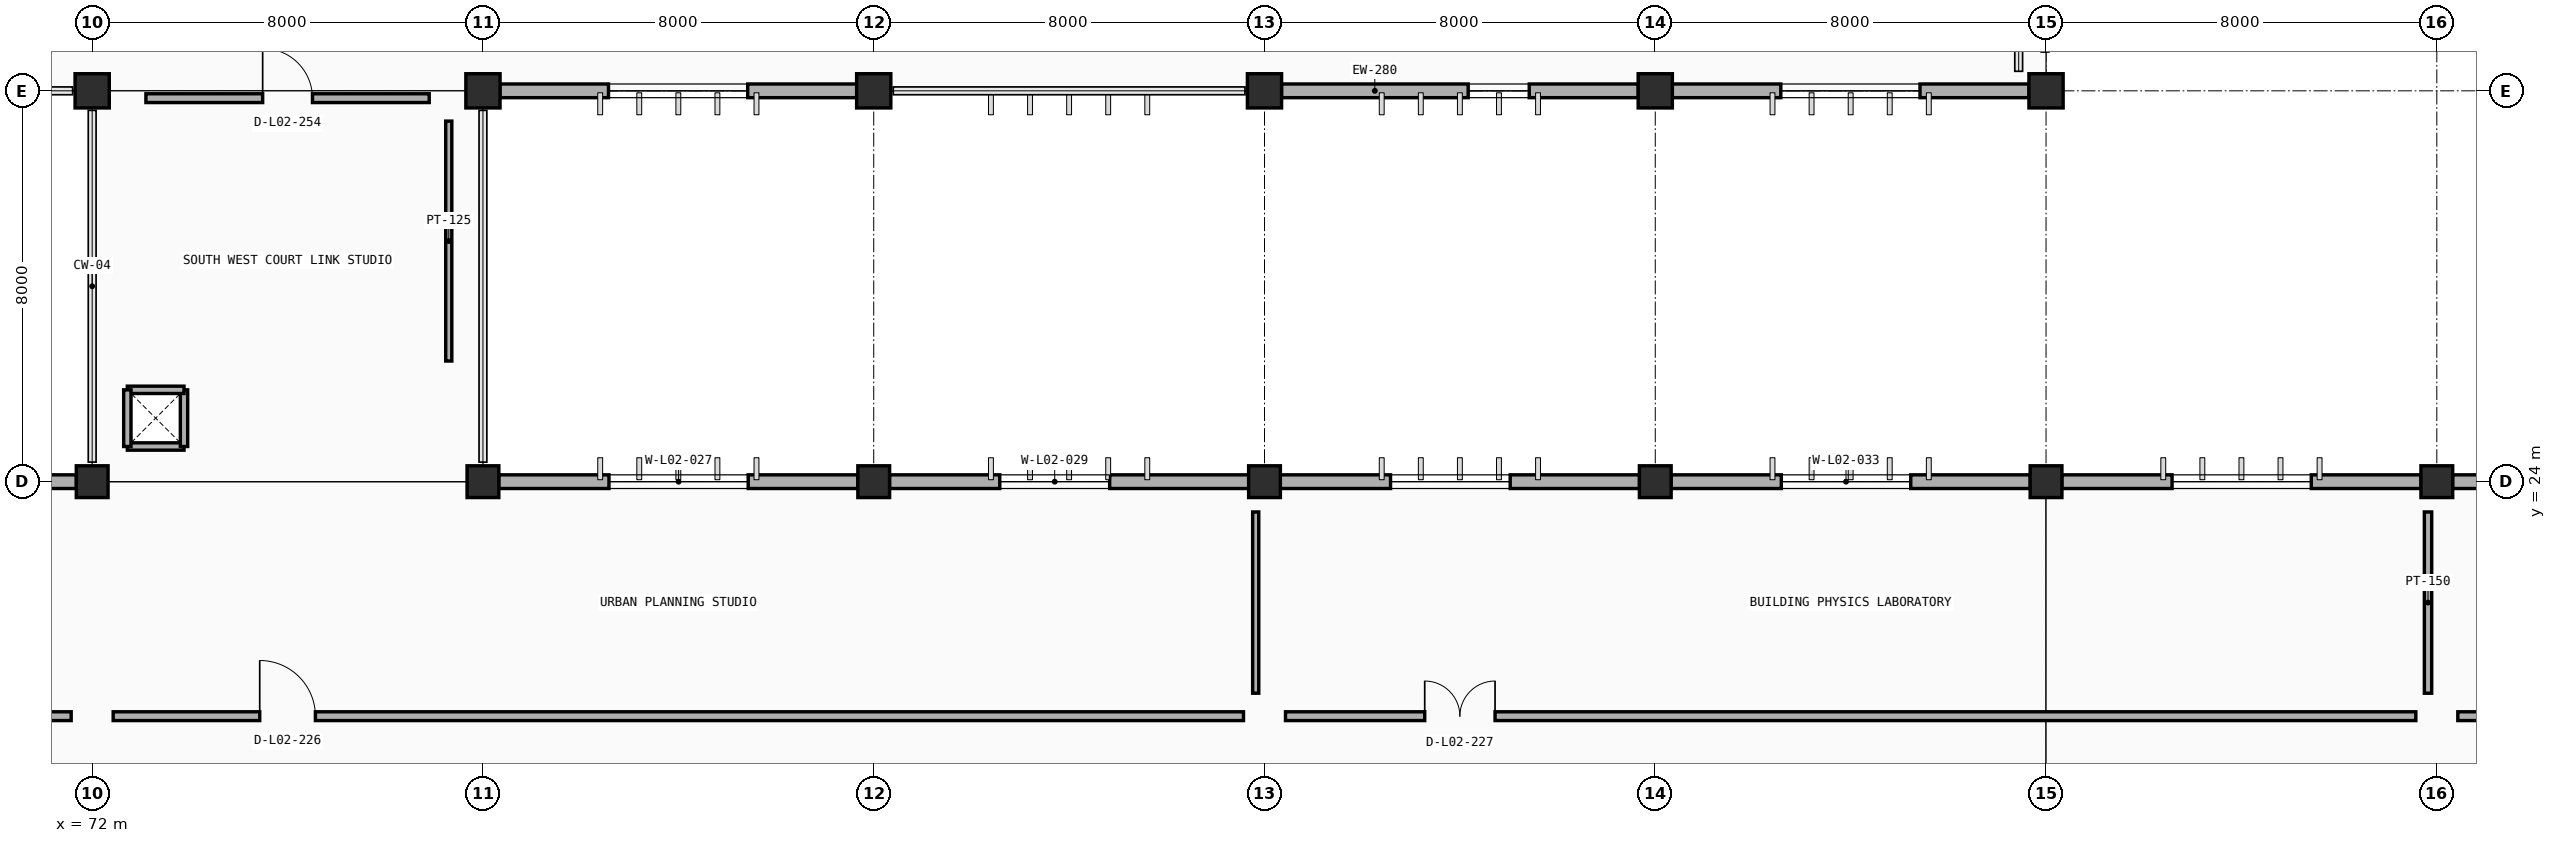
"""IFC4 building model, lengths in metres.
Left out: names, types, materials, properties, quantities, classifications, styles, units other than length and angle.
Written with IfcOpenShell. Run it as: python <this file> out.ifc"""

import sys

from ifc_helpers import new_model, si_unit, direction, frame, frame_2d, origin, origin_2d, place, context, subcontext, project, spatial, rectangle, extrude, element, fill, save


model = new_model("IFC4")
c1 = context("Model", 3, precision=1e-05, world=origin(), true_north=direction((0.0, 1.0)))
c2 = subcontext(c1, "Body", "Model", "MODEL_VIEW")
j1 = project(units=[si_unit("LENGTHUNIT", "METRE"), si_unit("PLANEANGLEUNIT", "RADIAN")], contexts=[c1])
p1 = place(None, origin())
s1 = spatial("IfcSite", under=j1, at=p1, CompositionType="ELEMENT")
p2 = place(p1, origin())
s2 = spatial("IfcBuilding", under=s1, at=p2, CompositionType="ELEMENT")
p3 = place(p2, frame((0.0, 0.0, 4.8)))
s3 = spatial("IfcBuildingStorey", under=s2, at=p3, CompositionType="ELEMENT", Elevation=4.8)
for number, where, z_axis, x_axis in (
    (1, (72.0, 24.0, 0.0), (0.0, 0.0, 1.0), (1.0, 0.0, 0.0)),
    (2, (80.0, 24.0, 0.0), (0.0, 0.0, 1.0), (1.0, 0.0, 0.0)),
    (3, (88.0, 24.0, 0.0), (0.0, 0.0, 1.0), (1.0, 0.0, 0.0)),
    (4, (96.0, 24.0, 0.0), (0.0, 0.0, 1.0), (1.0, 0.0, 0.0)),
    (5, (104.0, 24.0, 0.0), (0.0, 0.0, 1.0), (1.0, 0.0, 0.0)),
    (6, (112.0, 24.0, 0.0), (0.0, 0.0, 1.0), (1.0, 0.0, 0.0)),
    (7, (120.0, 24.0, 0.0), (0.0, 0.0, 1.0), (1.0, 0.0, 0.0)),
):
    element("IfcColumn", number, at=place(p3, frame(where, z_axis=z_axis, x_axis=x_axis)), inside=s3, PredefinedType="COLUMN", context=c2, shape_type="SweptSolid", body=[
        extrude(rectangle(XDim=0.65, YDim=0.65, at=origin_2d()), origin(), (0.0, 0.0, 1.0), 4.8),
    ])
for number, where, z_axis, x_axis in (
    (8, (72.0, 32.0, 0.0), (0.0, 0.0, 1.0), (1.0, 0.0, 0.0)),
    (9, (80.0, 32.0, 0.0), (0.0, 0.0, 1.0), (1.0, 0.0, 0.0)),
    (10, (88.0, 32.0, 0.0), (0.0, 0.0, 1.0), (1.0, 0.0, 0.0)),
    (11, (96.0, 32.0, 0.0), (0.0, 0.0, 1.0), (1.0, 0.0, 0.0)),
    (12, (104.0, 32.0, 0.0), (0.0, 0.0, 1.0), (1.0, 0.0, 0.0)),
    (13, (112.0, 32.0, 0.0), (0.0, 0.0, 1.0), (1.0, 0.0, 0.0)),
):
    element("IfcColumn", number, at=place(p3, frame(where, z_axis=z_axis, x_axis=x_axis)), inside=s3, PredefinedType="COLUMN", context=c2, shape_type="SweptSolid", body=[
        extrude(rectangle(XDim=0.7, YDim=0.7, at=origin_2d()), origin(), (0.0, 0.0, 1.0), 4.8),
    ])
p4 = place(p3, frame((64.322, 24.0, 0.0), z_axis=(0.0, 0.0, 1.0), x_axis=(1.0, 0.0, 0.0)))
e14 = element("IfcWall", 14, at=p4, inside=s3, PredefinedType="STANDARD", context=c2, shape_type="SweptSolid", body=[
    extrude(rectangle(XDim=7.356, YDim=0.28, at=frame_2d((3.678, 0.0))), origin(), (0.0, 0.0, 1.0), 3.91),
])
p5 = place(p4, frame((2.258, 0.0, 0.9)))
e15 = element("IfcOpeningElement", 15, at=p5, cuts=e14, PredefinedType="OPENING", context=c2, shape_type="SweptSolid", body=[
    extrude(rectangle(XDim=2.45, YDim=1.25, at=frame_2d((1.225, 0.625))), frame((0.0, 0.15, 0.0), z_axis=(0.0, -1.0, 0.0), x_axis=(1.0, 0.0, 0.0)), (0.0, 0.0, 1.0), 0.3),
])
p6 = place(p3, frame((80.322, 24.0, 0.0), z_axis=(0.0, 0.0, 1.0), x_axis=(1.0, 0.0, 0.0)))
e16 = element("IfcWall", 16, at=p6, inside=s3, PredefinedType="STANDARD", context=c2, shape_type="SweptSolid", body=[
    extrude(rectangle(XDim=7.356, YDim=0.28, at=frame_2d((3.678, 0.0))), origin(), (0.0, 0.0, 1.0), 3.91),
])
p7 = place(p6, frame((2.258, 0.0, 0.9)))
e17 = element("IfcOpeningElement", 17, at=p7, cuts=e16, PredefinedType="OPENING", context=c2, shape_type="SweptSolid", body=[
    extrude(rectangle(XDim=2.85, YDim=1.25, at=frame_2d((1.425, 0.625))), frame((0.0, 0.15, 0.0), z_axis=(0.0, -1.0, 0.0), x_axis=(1.0, 0.0, 0.0)), (0.0, 0.0, 1.0), 0.3),
])
p8 = place(p3, frame((88.322, 24.0, 0.0), z_axis=(0.0, 0.0, 1.0), x_axis=(1.0, 0.0, 0.0)))
e18 = element("IfcWall", 18, at=p8, inside=s3, PredefinedType="STANDARD", context=c2, shape_type="SweptSolid", body=[
    extrude(rectangle(XDim=7.356, YDim=0.28, at=frame_2d((3.678, 0.0))), origin(), (0.0, 0.0, 1.0), 3.91),
])
p9 = place(p8, frame((2.258, 0.0, 0.9)))
e19 = element("IfcOpeningElement", 19, at=p9, cuts=e18, PredefinedType="OPENING", context=c2, shape_type="SweptSolid", body=[
    extrude(rectangle(XDim=2.25, YDim=1.25, at=frame_2d((1.125, 0.625))), frame((0.0, 0.15, 0.0), z_axis=(0.0, -1.0, 0.0), x_axis=(1.0, 0.0, 0.0)), (0.0, 0.0, 1.0), 0.3),
])
p10 = place(p3, frame((96.322, 24.0, 0.0), z_axis=(0.0, 0.0, 1.0), x_axis=(1.0, 0.0, 0.0)))
e20 = element("IfcWall", 20, at=p10, inside=s3, PredefinedType="STANDARD", context=c2, shape_type="SweptSolid", body=[
    extrude(rectangle(XDim=7.356, YDim=0.28, at=frame_2d((3.678, 0.0))), origin(), (0.0, 0.0, 1.0), 3.91),
])
p11 = place(p10, frame((2.258, 0.0, 0.9)))
e21 = element("IfcOpeningElement", 21, at=p11, cuts=e20, PredefinedType="OPENING", context=c2, shape_type="SweptSolid", body=[
    extrude(rectangle(XDim=2.45, YDim=1.25, at=frame_2d((1.225, 0.625))), frame((0.0, 0.15, 0.0), z_axis=(0.0, -1.0, 0.0), x_axis=(1.0, 0.0, 0.0)), (0.0, 0.0, 1.0), 0.3),
])
p12 = place(p3, frame((104.322, 24.0, 0.0), z_axis=(0.0, 0.0, 1.0), x_axis=(1.0, 0.0, 0.0)))
e22 = element("IfcWall", 22, at=p12, inside=s3, PredefinedType="STANDARD", context=c2, shape_type="SweptSolid", body=[
    extrude(rectangle(XDim=7.356, YDim=0.28, at=frame_2d((3.678, 0.0))), origin(), (0.0, 0.0, 1.0), 3.91),
])
p13 = place(p12, frame((2.258, 0.0, 0.9)))
e23 = element("IfcOpeningElement", 23, at=p13, cuts=e22, PredefinedType="OPENING", context=c2, shape_type="SweptSolid", body=[
    extrude(rectangle(XDim=2.65, YDim=1.25, at=frame_2d((1.325, 0.625))), frame((0.0, 0.15, 0.0), z_axis=(0.0, -1.0, 0.0), x_axis=(1.0, 0.0, 0.0)), (0.0, 0.0, 1.0), 0.3),
])
p14 = place(p3, frame((112.322, 24.0, 0.0), z_axis=(0.0, 0.0, 1.0), x_axis=(1.0, 0.0, 0.0)))
e24 = element("IfcWall", 24, at=p14, inside=s3, PredefinedType="STANDARD", context=c2, shape_type="SweptSolid", body=[
    extrude(rectangle(XDim=7.356, YDim=0.28, at=frame_2d((3.678, 0.0))), origin(), (0.0, 0.0, 1.0), 3.91),
])
p15 = place(p14, frame((2.258, 0.0, 0.9)))
e25 = element("IfcOpeningElement", 25, at=p15, cuts=e24, PredefinedType="OPENING", context=c2, shape_type="SweptSolid", body=[
    extrude(rectangle(XDim=2.85, YDim=1.25, at=frame_2d((1.425, 0.625))), frame((0.0, 0.15, 0.0), z_axis=(0.0, -1.0, 0.0), x_axis=(1.0, 0.0, 0.0)), (0.0, 0.0, 1.0), 0.3),
])
p16 = place(p3, frame((120.322, 24.0, 0.0), z_axis=(0.0, 0.0, 1.0), x_axis=(1.0, 0.0, 0.0)))
e26 = element("IfcWall", 26, at=p16, inside=s3, PredefinedType="STANDARD", context=c2, shape_type="SweptSolid", body=[
    extrude(rectangle(XDim=7.356, YDim=0.28, at=frame_2d((3.678, 0.0))), origin(), (0.0, 0.0, 1.0), 3.91),
])
p17 = place(p16, frame((2.258, 0.0, 0.9)))
e27 = element("IfcOpeningElement", 27, at=p17, cuts=e26, PredefinedType="OPENING", context=c2, shape_type="SweptSolid", body=[
    extrude(rectangle(XDim=2.25, YDim=1.25, at=frame_2d((1.125, 0.625))), frame((0.0, 0.15, 0.0), z_axis=(0.0, -1.0, 0.0), x_axis=(1.0, 0.0, 0.0)), (0.0, 0.0, 1.0), 0.3),
])
p18 = place(p3, frame((87.653, 32.0, 0.0), z_axis=(0.0, 0.0, 1.0), x_axis=(-1.0, 0.0, 0.0)))
e28 = element("IfcWall", 28, at=p18, inside=s3, PredefinedType="STANDARD", context=c2, shape_type="SweptSolid", body=[
    extrude(rectangle(XDim=7.306, YDim=0.28, at=frame_2d((3.653, 0.0))), origin(), (0.0, 0.0, 1.0), 3.91),
])
p19 = place(p18, frame((2.233, 0.0, 0.9)))
e29 = element("IfcOpeningElement", 29, at=p19, cuts=e28, PredefinedType="OPENING", context=c2, shape_type="SweptSolid", body=[
    extrude(rectangle(XDim=2.85, YDim=1.4, at=frame_2d((1.425, 0.7))), frame((0.0, 0.15, 0.0), z_axis=(0.0, -1.0, 0.0), x_axis=(1.0, 0.0, 0.0)), (0.0, 0.0, 1.0), 0.3),
])
p20 = place(p3, frame((103.653, 32.0, 0.0), z_axis=(0.0, 0.0, 1.0), x_axis=(-1.0, 0.0, 0.0)))
e30 = element("IfcWall", 30, at=p20, inside=s3, PredefinedType="STANDARD", context=c2, shape_type="SweptSolid", body=[
    extrude(rectangle(XDim=7.306, YDim=0.28, at=frame_2d((3.653, 0.0))), origin(), (0.0, 0.0, 1.0), 3.91),
])
p21 = place(p20, frame((2.233, 0.0, 0.9)))
e31 = element("IfcOpeningElement", 31, at=p21, cuts=e30, PredefinedType="OPENING", context=c2, shape_type="SweptSolid", body=[
    extrude(rectangle(XDim=1.25, YDim=1.55, at=frame_2d((0.625, 0.775))), frame((0.0, 0.15, 0.0), z_axis=(0.0, -1.0, 0.0), x_axis=(1.0, 0.0, 0.0)), (0.0, 0.0, 1.0), 0.3),
])
p22 = place(p3, frame((111.653, 32.0, 0.0), z_axis=(0.0, 0.0, 1.0), x_axis=(-1.0, 0.0, 0.0)))
e32 = element("IfcWall", 32, at=p22, inside=s3, PredefinedType="STANDARD", context=c2, shape_type="SweptSolid", body=[
    extrude(rectangle(XDim=7.306, YDim=0.28, at=frame_2d((3.653, 0.0))), origin(), (0.0, 0.0, 1.0), 3.91),
])
p23 = place(p22, frame((2.233, 0.0, 0.9)))
e33 = element("IfcOpeningElement", 33, at=p23, cuts=e32, PredefinedType="OPENING", context=c2, shape_type="SweptSolid", body=[
    extrude(rectangle(XDim=2.85, YDim=1.4, at=frame_2d((1.425, 0.7))), frame((0.0, 0.15, 0.0), z_axis=(0.0, -1.0, 0.0), x_axis=(1.0, 0.0, 0.0)), (0.0, 0.0, 1.0), 0.3),
])
p24 = place(p3, frame((111.76, 32.22, 0.0), z_axis=(0.0, 0.0, 1.0), x_axis=(-1.0, 0.0, 0.0)))
e34 = element("IfcWall", 34, at=p24, inside=s3, PredefinedType="PARAPET", context=c2, shape_type="SweptSolid", body=[
    extrude(rectangle(XDim=0.32, YDim=0.2, at=frame_2d((0.16, 0.0))), origin(), (0.0, 0.0, 1.0), 3.95),
])
for number, where, z_axis, x_axis in (
    (35, (72.72, 24.72, 0.0), (0.0, 0.0, 1.0), (1.0, 0.0, 0.0)),
    (36, (73.88, 24.72, 0.0), (0.0, 0.0, 1.0), (0.0, 1.0, 0.0)),
    (37, (73.88, 25.88, 0.0), (0.0, 0.0, 1.0), (-1.0, 0.0, 0.0)),
    (38, (72.72, 25.88, 0.0), (0.0, 0.0, 1.0), (0.0, -1.0, 0.0)),
):
    element("IfcWall", number, at=place(p3, frame(where, z_axis=z_axis, x_axis=x_axis)), inside=s3, PredefinedType="PARTITIONING", context=c2, shape_type="SweptSolid", body=[
        extrude(rectangle(XDim=1.16, YDim=0.15, at=frame_2d((0.58, 0.0))), origin(), (0.0, 0.0, 1.0), 4.5),
    ])
p25 = place(p3, frame((56.43, 19.2, 0.0), z_axis=(0.0, 0.0, 1.0), x_axis=(1.0, 0.0, 0.0)))
e39 = element("IfcWall", 39, at=p25, inside=s3, PredefinedType="PARTITIONING", context=c2, shape_type="SweptSolid", body=[
    extrude(rectangle(XDim=15.14, YDim=0.18, at=frame_2d((7.57, 0.0))), origin(), (0.0, 0.0, 1.0), 3.9),
])
p26 = place(p25, frame((3.03, 0.0, 0.0)))
e40 = element("IfcOpeningElement", 40, at=p26, cuts=e39, PredefinedType="OPENING", context=c2, shape_type="SweptSolid", body=[
    extrude(rectangle(XDim=1.08, YDim=2.15, at=frame_2d((0.54, 1.075))), frame((0.0, 0.1, 0.0), z_axis=(0.0, -1.0, 0.0), x_axis=(1.0, 0.0, 0.0)), (0.0, 0.0, 1.0), 0.2),
])
p27 = place(p3, frame((72.43, 19.2, 0.0), z_axis=(0.0, 0.0, 1.0), x_axis=(1.0, 0.0, 0.0)))
e41 = element("IfcWall", 41, at=p27, inside=s3, PredefinedType="PARTITIONING", context=c2, shape_type="SweptSolid", body=[
    extrude(rectangle(XDim=23.14, YDim=0.18, at=frame_2d((11.57, 0.0))), origin(), (0.0, 0.0, 1.0), 3.9),
])
p28 = place(p27, frame((3.0, 0.0, 0.0)))
e42 = element("IfcOpeningElement", 42, at=p28, cuts=e41, PredefinedType="OPENING", context=c2, shape_type="SweptSolid", body=[
    extrude(rectangle(XDim=1.14, YDim=2.15, at=frame_2d((0.57, 1.075))), frame((0.0, 0.1, 0.0), z_axis=(0.0, -1.0, 0.0), x_axis=(1.0, 0.0, 0.0)), (0.0, 0.0, 1.0), 0.2),
])
p29 = place(p3, frame((95.82, 19.67, 0.0), z_axis=(0.0, 0.0, 1.0), x_axis=(0.0, 1.0, 0.0)))
e43 = element("IfcWall", 43, at=p29, inside=s3, PredefinedType="PARTITIONING", context=c2, shape_type="SweptSolid", body=[
    extrude(rectangle(XDim=3.71, YDim=0.125, at=frame_2d((1.855, 0.0))), origin(), (0.0, 0.0, 1.0), 3.76),
])
p30 = place(p3, frame((96.43, 19.2, 0.0), z_axis=(0.0, 0.0, 1.0), x_axis=(1.0, 0.0, 0.0)))
e44 = element("IfcWall", 44, at=p30, inside=s3, PredefinedType="PARTITIONING", context=c2, shape_type="SweptSolid", body=[
    extrude(rectangle(XDim=23.14, YDim=0.18, at=frame_2d((11.57, 0.0))), origin(), (0.0, 0.0, 1.0), 3.9),
])
p31 = place(p30, frame((2.85, 0.0, 0.0)))
e45 = element("IfcOpeningElement", 45, at=p31, cuts=e44, PredefinedType="OPENING", context=c2, shape_type="SweptSolid", body=[
    extrude(rectangle(XDim=1.44, YDim=2.2, at=frame_2d((0.72, 1.1))), frame((0.0, 0.1, 0.0), z_axis=(0.0, -1.0, 0.0), x_axis=(1.0, 0.0, 0.0)), (0.0, 0.0, 1.0), 0.2),
])
p32 = place(p3, frame((119.82, 19.67, 0.0), z_axis=(0.0, 0.0, 1.0), x_axis=(0.0, 1.0, 0.0)))
e46 = element("IfcWall", 46, at=p32, inside=s3, PredefinedType="PARTITIONING", context=c2, shape_type="SweptSolid", body=[
    extrude(rectangle(XDim=3.71, YDim=0.15, at=frame_2d((1.855, 0.0))), origin(), (0.0, 0.0, 1.0), 3.76),
])
p33 = place(p3, frame((120.43, 19.2, 0.0), z_axis=(0.0, 0.0, 1.0), x_axis=(1.0, 0.0, 0.0)))
e47 = element("IfcWall", 47, at=p33, inside=s3, PredefinedType="PARTITIONING", context=c2, shape_type="SweptSolid", body=[
    extrude(rectangle(XDim=23.14, YDim=0.18, at=frame_2d((11.57, 0.0))), origin(), (0.0, 0.0, 1.0), 3.9),
])
p34 = place(p33, frame((2.74, 0.0, 0.0)))
e48 = element("IfcOpeningElement", 48, at=p34, cuts=e47, PredefinedType="OPENING", context=c2, shape_type="SweptSolid", body=[
    extrude(rectangle(XDim=1.66, YDim=2.22, at=frame_2d((0.83, 1.11))), frame((0.0, 0.1, 0.0), z_axis=(0.0, -1.0, 0.0), x_axis=(1.0, 0.0, 0.0)), (0.0, 0.0, 1.0), 0.2),
])
p35 = place(p3, frame((73.1, 31.85, 0.0), z_axis=(0.0, 0.0, 1.0), x_axis=(1.0, 0.0, 0.0)))
e49 = element("IfcWall", 49, at=p35, inside=s3, PredefinedType="PARTITIONING", context=c2, shape_type="SweptSolid", body=[
    extrude(rectangle(XDim=5.8, YDim=0.18, at=frame_2d((2.9, 0.0))), origin(), (0.0, 0.0, 1.0), 3.9),
])
p36 = place(p35, frame((2.39, 0.0, 0.0)))
e50 = element("IfcOpeningElement", 50, at=p36, cuts=e49, PredefinedType="OPENING", context=c2, shape_type="SweptSolid", body=[
    extrude(rectangle(XDim=1.02, YDim=2.1, at=frame_2d((0.51, 1.05))), frame((0.0, 0.1, 0.0), z_axis=(0.0, -1.0, 0.0), x_axis=(1.0, 0.0, 0.0)), (0.0, 0.0, 1.0), 0.2),
])
p37 = place(p3, frame((79.3, 26.47, 0.0), z_axis=(0.0, 0.0, 1.0), x_axis=(0.0, 1.0, 0.0)))
e51 = element("IfcWall", 51, at=p37, inside=s3, PredefinedType="PARTITIONING", context=c2, shape_type="SweptSolid", body=[
    extrude(rectangle(XDim=4.91, YDim=0.125, at=frame_2d((2.455, 0.0))), origin(), (0.0, 0.0, 1.0), 3.9),
])
p38 = place(p7, origin())
e52 = element("IfcWindow", 52, at=p38, inside=s3, PartitioningType="DOUBLE_PANEL_VERTICAL", PredefinedType="WINDOW", context=c2, shape_type="SweptSolid", body=[
    extrude(rectangle(XDim=2.85, YDim=1.25, at=frame_2d((1.425, 0.625))), frame((0.0, 0.03, 0.0), z_axis=(0.0, -1.0, 0.0), x_axis=(1.0, 0.0, 0.0)), (0.0, 0.0, 1.0), 0.06),
])
fill(e17, e52)
p39 = place(p9, origin())
e53 = element("IfcWindow", 53, at=p39, inside=s3, PartitioningType="DOUBLE_PANEL_VERTICAL", PredefinedType="WINDOW", context=c2, shape_type="SweptSolid", body=[
    extrude(rectangle(XDim=2.25, YDim=1.25, at=frame_2d((1.125, 0.625))), frame((0.0, 0.03, 0.0), z_axis=(0.0, -1.0, 0.0), x_axis=(1.0, 0.0, 0.0)), (0.0, 0.0, 1.0), 0.06),
])
fill(e19, e53)
p40 = place(p11, origin())
e54 = element("IfcWindow", 54, at=p40, inside=s3, PartitioningType="DOUBLE_PANEL_VERTICAL", PredefinedType="WINDOW", context=c2, shape_type="SweptSolid", body=[
    extrude(rectangle(XDim=2.45, YDim=1.25, at=frame_2d((1.225, 0.625))), frame((0.0, 0.03, 0.0), z_axis=(0.0, -1.0, 0.0), x_axis=(1.0, 0.0, 0.0)), (0.0, 0.0, 1.0), 0.06),
])
fill(e21, e54)
p41 = place(p13, origin())
e55 = element("IfcWindow", 55, at=p41, inside=s3, PartitioningType="DOUBLE_PANEL_VERTICAL", PredefinedType="WINDOW", context=c2, shape_type="SweptSolid", body=[
    extrude(rectangle(XDim=2.65, YDim=1.25, at=frame_2d((1.325, 0.625))), frame((0.0, 0.03, 0.0), z_axis=(0.0, -1.0, 0.0), x_axis=(1.0, 0.0, 0.0)), (0.0, 0.0, 1.0), 0.06),
])
fill(e23, e55)
p42 = place(p15, origin())
e56 = element("IfcWindow", 56, at=p42, inside=s3, PartitioningType="DOUBLE_PANEL_VERTICAL", PredefinedType="WINDOW", context=c2, shape_type="SweptSolid", body=[
    extrude(rectangle(XDim=2.85, YDim=1.25, at=frame_2d((1.425, 0.625))), frame((0.0, 0.03, 0.0), z_axis=(0.0, -1.0, 0.0), x_axis=(1.0, 0.0, 0.0)), (0.0, 0.0, 1.0), 0.06),
])
fill(e25, e56)
p43 = place(p19, origin())
e57 = element("IfcWindow", 57, at=p43, inside=s3, PartitioningType="DOUBLE_PANEL_VERTICAL", PredefinedType="WINDOW", context=c2, shape_type="SweptSolid", body=[
    extrude(rectangle(XDim=2.85, YDim=1.4, at=frame_2d((1.425, 0.7))), frame((0.0, 0.03, 0.0), z_axis=(0.0, -1.0, 0.0), x_axis=(1.0, 0.0, 0.0)), (0.0, 0.0, 1.0), 0.06),
])
fill(e29, e57)
p44 = place(p21, origin())
e58 = element("IfcWindow", 58, at=p44, inside=s3, PartitioningType="SINGLE_PANEL", PredefinedType="WINDOW", context=c2, shape_type="SweptSolid", body=[
    extrude(rectangle(XDim=1.25, YDim=1.55, at=frame_2d((0.625, 0.775))), frame((0.0, 0.03, 0.0), z_axis=(0.0, -1.0, 0.0), x_axis=(1.0, 0.0, 0.0)), (0.0, 0.0, 1.0), 0.06),
])
fill(e31, e58)
p45 = place(p23, origin())
e59 = element("IfcWindow", 59, at=p45, inside=s3, PartitioningType="DOUBLE_PANEL_VERTICAL", PredefinedType="WINDOW", context=c2, shape_type="SweptSolid", body=[
    extrude(rectangle(XDim=2.85, YDim=1.4, at=frame_2d((1.425, 0.7))), frame((0.0, 0.03, 0.0), z_axis=(0.0, -1.0, 0.0), x_axis=(1.0, 0.0, 0.0)), (0.0, 0.0, 1.0), 0.06),
])
fill(e33, e59)
p46 = place(p28, origin())
e60 = element("IfcDoor", 60, at=p46, inside=s3, OperationType="SINGLE_SWING_LEFT", PredefinedType="DOOR", context=c2, shape_type="SweptSolid", body=[
    extrude(rectangle(XDim=1.14, YDim=2.15, at=frame_2d((0.57, 1.075))), frame((0.0, 0.025, 0.0), z_axis=(0.0, -1.0, 0.0), x_axis=(1.0, 0.0, 0.0)), (0.0, 0.0, 1.0), 0.05),
])
fill(e42, e60)
p47 = place(p31, origin())
e61 = element("IfcDoor", 61, at=p47, inside=s3, OperationType="DOUBLE_DOOR_SINGLE_SWING", PredefinedType="DOOR", context=c2, shape_type="SweptSolid", body=[
    extrude(rectangle(XDim=1.44, YDim=2.2, at=frame_2d((0.72, 1.1))), frame((0.0, 0.025, 0.0), z_axis=(0.0, -1.0, 0.0), x_axis=(1.0, 0.0, 0.0)), (0.0, 0.0, 1.0), 0.05),
])
fill(e45, e61)
p48 = place(p36, origin())
e62 = element("IfcDoor", 62, at=p48, inside=s3, OperationType="SINGLE_SWING_LEFT", PredefinedType="DOOR", context=c2, shape_type="SweptSolid", body=[
    extrude(rectangle(XDim=1.02, YDim=2.1, at=frame_2d((0.51, 1.05))), frame((0.0, 0.025, 0.0), z_axis=(0.0, -1.0, 0.0), x_axis=(1.0, 0.0, 0.0)), (0.0, 0.0, 1.0), 0.05),
])
fill(e50, e62)
save(model, sys.argv[1])
